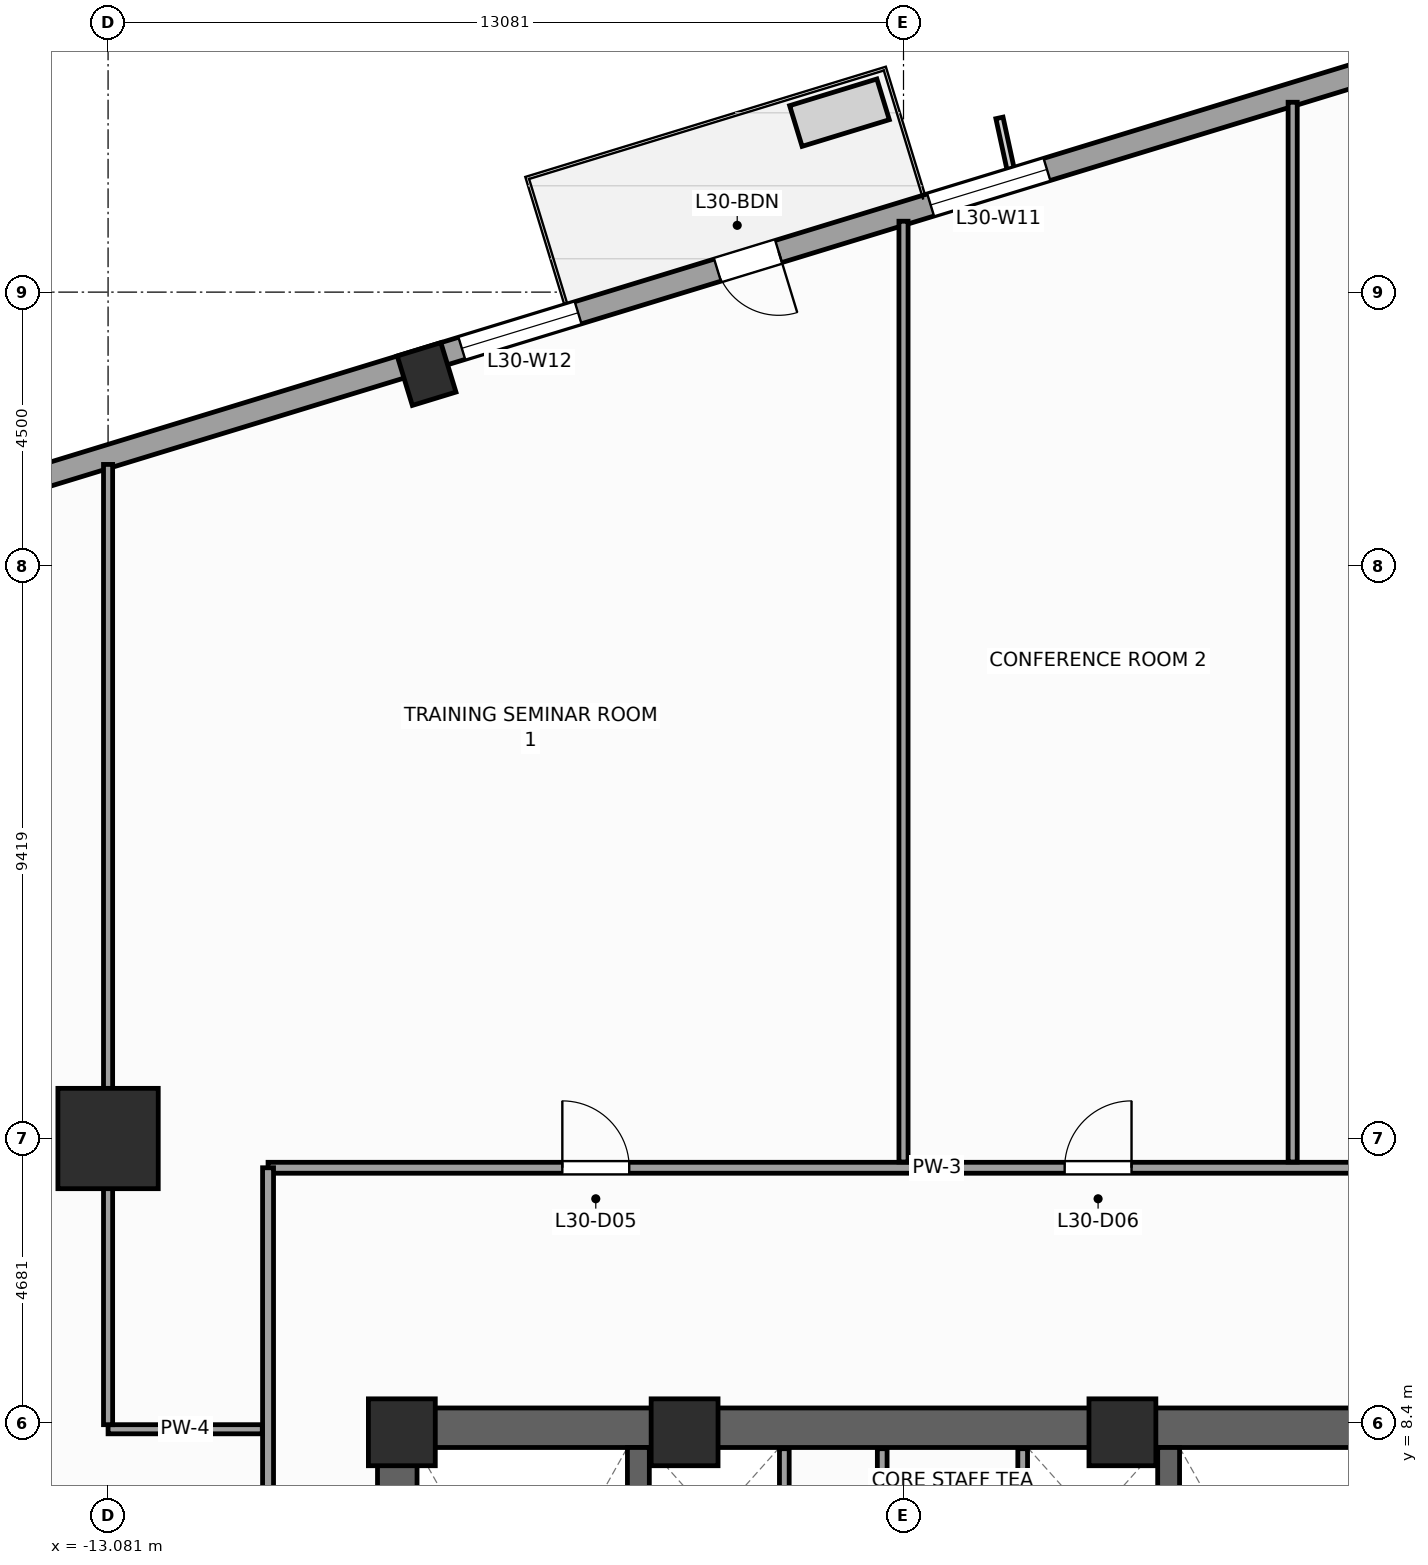
"""IFC4 building model, lengths in metres.
Left out: names, types, materials, properties, quantities, classifications, styles, units other than length and angle.
Written with IfcOpenShell. Run it as: python <this file> out.ifc"""

import sys

from ifc_helpers import new_model, si_unit, direction, frame, frame_2d, origin, origin_2d, place, context, subcontext, project, spatial, rectangle, extrude, source, transform, mapped, element, fill, save


model = new_model("IFC4")
c1 = context("Model", 3, precision=1e-05, world=origin(), true_north=direction((0.0, 1.0)))
c2 = subcontext(c1, "Body", "Model", "MODEL_VIEW")
j1 = project(units=[si_unit("LENGTHUNIT", "METRE"), si_unit("PLANEANGLEUNIT", "RADIAN")], contexts=[c1])
p1 = place(None, origin())
s1 = spatial("IfcSite", under=j1, at=p1, CompositionType="ELEMENT")
p2 = place(p1, origin())
s2 = spatial("IfcBuilding", under=s1, at=p2, CompositionType="ELEMENT")
p3 = place(p2, frame((0.0, 0.0, 127.2)))
s3 = spatial("IfcBuildingStorey", under=s2, at=p3, CompositionType="ELEMENT", Elevation=127.2)
p4 = place(p3, frame((-8.65, 8.325, 0.0), z_axis=(0.0, 0.0, 1.0), x_axis=(1.0, 0.0, 0.0)))
e1 = element("IfcWall", 1, at=p4, inside=s3, PredefinedType="SHEAR", context=c2, shape_type="SweptSolid", body=[
    extrude(rectangle(XDim=17.3, YDim=0.65, at=frame_2d((8.65, 0.0))), origin(), (0.0, 0.0, 1.0), 4.0),
])
p5 = place(p3, frame((-8.325, -8.0, 0.0), z_axis=(0.0, 0.0, 1.0), x_axis=(0.0, 1.0, 0.0)))
e2 = element("IfcWall", 2, at=p5, inside=s3, PredefinedType="SHEAR", context=c2, shape_type="SweptSolid", body=[
    extrude(rectangle(XDim=16.0, YDim=0.65, at=frame_2d((8.0, 0.0))), origin(), (0.0, 0.0, 1.0), 4.0),
])
p6 = place(p5, frame((4.69, 0.0, 0.0)))
e3 = element("IfcOpeningElement", 3, at=p6, cuts=e2, PredefinedType="OPENING", context=c2, shape_type="SweptSolid", body=[
    extrude(rectangle(XDim=1.3, YDim=2.2, at=frame_2d((0.65, 1.1))), frame((0.0, 0.335, 0.0), z_axis=(0.0, -1.0, 0.0), x_axis=(1.0, 0.0, 0.0)), (0.0, 0.0, 1.0), 0.67),
])
for number, where, z_axis, x_axis in (
    (4, (-4.36, -8.0, 0.0), (0.0, 0.0, 1.0), (0.0, 1.0, 0.0)),
    (5, (4.36, -8.0, 0.0), (0.0, 0.0, 1.0), (0.0, 1.0, 0.0)),
):
    element("IfcWall", number, at=place(p3, frame(where, z_axis=z_axis, x_axis=x_axis)), inside=s3, PredefinedType="SHEAR", context=c2, shape_type="SweptSolid", body=[
        extrude(rectangle(XDim=16.0, YDim=0.36, at=frame_2d((8.0, 0.0))), origin(), (0.0, 0.0, 1.0), 4.0),
    ])
m1 = source(origin(), c2, "Body", "SweptSolid", [
    extrude(rectangle(XDim=1.1, YDim=1.1, at=origin_2d()), origin(), (0.0, 0.0, 1.0), 4.0),
])
for number, where, z_axis, x_axis in (
    (6, (-8.25, 8.25, 0.0), (0.0, 0.0, 1.0), (1.0, 0.0, 0.0)),
    (7, (-3.6, 8.25, 0.0), (0.0, 0.0, 1.0), (1.0, 0.0, 0.0)),
    (8, (3.6, 8.25, 0.0), (0.0, 0.0, 1.0), (1.0, 0.0, 0.0)),
):
    element("IfcColumn", number, at=place(p3, frame(where, z_axis=z_axis, x_axis=x_axis)), inside=s3, PredefinedType="PILASTER", context=c2, shape_type="MappedRepresentation", body=[
        mapped(m1, transform((0.0, 0.0, 0.0), scale=1.0)),
    ])
m2 = source(origin(), c2, "Body", "SweptSolid", [
    extrude(rectangle(XDim=1.65, YDim=1.65, at=origin_2d()), origin(), (0.0, 0.0, 1.0), 4.0),
])
p7 = place(p3, frame((-13.081, 13.081, 0.0), z_axis=(0.0, 0.0, 1.0), x_axis=(1.0, 0.0, 0.0)))
e9 = element("IfcColumn", 9, at=p7, inside=s3, PredefinedType="COLUMN", context=c2, shape_type="MappedRepresentation", body=[
    mapped(m2, transform((0.0, 0.0, 0.0), scale=1.0)),
])
m3 = source(origin(), c2, "Body", "SweptSolid", [
    extrude(rectangle(XDim=0.75, YDim=0.85, at=origin_2d()), origin(), (0.0, 0.0, 1.0), 4.0),
])
p8 = place(p3, frame((-7.843, 25.653, 0.0), z_axis=(0.0, 0.0, 1.0), x_axis=(0.956304755963, 0.292371704723, 0.0)))
e10 = element("IfcColumn", 10, at=p8, inside=s3, PredefinedType="COLUMN", context=c2, shape_type="MappedRepresentation", body=[
    mapped(m3, transform((0.0, 0.0, 0.0), scale=1.0)),
])
p9 = place(p3, frame((14.265, 32.658, 0.0), z_axis=(0.0, 0.0, 1.0), x_axis=(-0.956304320851, -0.292373127906, 0.0)))
e11 = element("IfcWall", 11, at=p9, inside=s3, PredefinedType="STANDARD", context=c2, shape_type="SweptSolid", body=[
    extrude(rectangle(XDim=46.38, YDim=0.38, at=frame_2d((23.19, 0.0))), origin(), (0.0, 0.0, 1.0), 3.14),
])
p10 = place(p9, frame((17.065, 0.0, 0.0)))
e12 = element("IfcOpeningElement", 12, at=p10, cuts=e11, PredefinedType="OPENING", context=c2, shape_type="SweptSolid", body=[
    extrude(rectangle(XDim=1.05, YDim=2.25, at=frame_2d((0.525, 1.125))), frame((0.0, 0.2, 0.0), z_axis=(0.0, -1.0, 0.0), x_axis=(1.0, 0.0, 0.0)), (0.0, 0.0, 1.0), 0.4),
])
p11 = place(p9, frame((4.865, 0.0, 0.51)))
e13 = element("IfcOpeningElement", 13, at=p11, cuts=e11, PredefinedType="OPENING", context=c2, shape_type="SweptSolid", body=[
    extrude(rectangle(XDim=1.4, YDim=2.4, at=frame_2d((0.7, 1.2))), frame((0.0, 0.2, 0.0), z_axis=(0.0, -1.0, 0.0), x_axis=(1.0, 0.0, 0.0)), (0.0, 0.0, 1.0), 0.4),
])
p12 = place(p9, frame((12.45, 0.0, 0.51)))
e14 = element("IfcOpeningElement", 14, at=p12, cuts=e11, PredefinedType="OPENING", context=c2, shape_type="SweptSolid", body=[
    extrude(rectangle(XDim=2.0, YDim=2.4, at=frame_2d((1.0, 1.2))), frame((0.0, 0.2, 0.0), z_axis=(0.0, -1.0, 0.0), x_axis=(1.0, 0.0, 0.0)), (0.0, 0.0, 1.0), 0.4),
])
p13 = place(p9, frame((20.512, 0.0, 0.51)))
e15 = element("IfcOpeningElement", 15, at=p13, cuts=e11, PredefinedType="OPENING", context=c2, shape_type="SweptSolid", body=[
    extrude(rectangle(XDim=2.0, YDim=2.4, at=frame_2d((1.0, 1.2))), frame((0.0, 0.2, 0.0), z_axis=(0.0, -1.0, 0.0), x_axis=(1.0, 0.0, 0.0)), (0.0, 0.0, 1.0), 0.4),
])
p14 = place(p9, frame((30.538, 0.0, 0.51)))
e16 = element("IfcOpeningElement", 16, at=p14, cuts=e11, PredefinedType="OPENING", context=c2, shape_type="SweptSolid", body=[
    extrude(rectangle(XDim=2.0, YDim=2.4, at=frame_2d((1.0, 1.2))), frame((0.0, 0.2, 0.0), z_axis=(0.0, -1.0, 0.0), x_axis=(1.0, 0.0, 0.0)), (0.0, 0.0, 1.0), 0.4),
])
p15 = place(p9, frame((39.187, 0.0, 0.51)))
e17 = element("IfcOpeningElement", 17, at=p15, cuts=e11, PredefinedType="OPENING", context=c2, shape_type="SweptSolid", body=[
    extrude(rectangle(XDim=1.4, YDim=2.4, at=frame_2d((0.7, 1.2))), frame((0.0, 0.2, 0.0), z_axis=(0.0, -1.0, 0.0), x_axis=(1.0, 0.0, 0.0)), (0.0, 0.0, 1.0), 0.4),
])
for number, where, z_axis, x_axis in (
    (18, (-1.96, 4.58, 0.0), (0.0, 0.0, 1.0), (0.0, 1.0, 0.0)),
    (19, (1.96, 4.58, 0.0), (0.0, 0.0, 1.0), (0.0, 1.0, 0.0)),
):
    element("IfcWall", number, at=place(p3, frame(where, z_axis=z_axis, x_axis=x_axis)), inside=s3, PredefinedType="PARTITIONING", context=c2, shape_type="SweptSolid", body=[
        extrude(rectangle(XDim=3.4, YDim=0.16, at=frame_2d((1.7, 0.0))), origin(), (0.0, 0.0, 1.0), 3.74),
    ])
p16 = place(p3, frame((-0.35, 4.6, 0.0), z_axis=(0.0, 0.0, 1.0), x_axis=(0.0, 1.0, 0.0)))
e20 = element("IfcWall", 20, at=p16, inside=s3, PredefinedType="PARTITIONING", context=c2, shape_type="SweptSolid", body=[
    extrude(rectangle(XDim=3.38, YDim=0.16, at=frame_2d((1.69, 0.0))), origin(), (0.0, 0.0, 1.0), 3.74),
])
p17 = place(p3, frame((-10.45, 12.6, 0.0), z_axis=(0.0, 0.0, 1.0), x_axis=(1.0, 0.0, 0.0)))
e21 = element("IfcWall", 21, at=p17, inside=s3, PredefinedType="PARTITIONING", context=c2, shape_type="SweptSolid", body=[
    extrude(rectangle(XDim=22.0, YDim=0.18, at=frame_2d((11.0, 0.0))), origin(), (0.0, 0.0, 1.0), 3.74),
])
p18 = place(p17, frame((4.839, 0.0, 0.0)))
e22 = element("IfcOpeningElement", 22, at=p18, cuts=e21, PredefinedType="OPENING", context=c2, shape_type="SweptSolid", body=[
    extrude(rectangle(XDim=1.1, YDim=2.2, at=frame_2d((0.55, 1.1))), frame((0.0, 0.1, 0.0), z_axis=(0.0, -1.0, 0.0), x_axis=(1.0, 0.0, 0.0)), (0.0, 0.0, 1.0), 0.2),
])
p19 = place(p17, frame((13.1, 0.0, 0.0)))
e23 = element("IfcOpeningElement", 23, at=p19, cuts=e21, PredefinedType="OPENING", context=c2, shape_type="SweptSolid", body=[
    extrude(rectangle(XDim=1.1, YDim=2.2, at=frame_2d((0.55, 1.1))), frame((0.0, 0.1, 0.0), z_axis=(0.0, -1.0, 0.0), x_axis=(1.0, 0.0, 0.0)), (0.0, 0.0, 1.0), 0.2),
])
p20 = place(p17, frame((18.71, 0.0, 0.0)))
e24 = element("IfcOpeningElement", 24, at=p20, cuts=e21, PredefinedType="OPENING", context=c2, shape_type="SweptSolid", body=[
    extrude(rectangle(XDim=1.1, YDim=2.2, at=frame_2d((0.55, 1.1))), frame((0.0, 0.1, 0.0), z_axis=(0.0, -1.0, 0.0), x_axis=(1.0, 0.0, 0.0)), (0.0, 0.0, 1.0), 0.2),
])
p21 = place(p3, frame((-10.45, -1.05, 0.0), z_axis=(0.0, 0.0, 1.0), x_axis=(0.0, 1.0, 0.0)))
e25 = element("IfcWall", 25, at=p21, inside=s3, PredefinedType="PARTITIONING", context=c2, shape_type="SweptSolid", body=[
    extrude(rectangle(XDim=13.65, YDim=0.18, at=frame_2d((6.825, 0.0))), origin(), (0.0, 0.0, 1.0), 3.74),
])
p22 = place(p21, frame((1.455, 0.0, 0.0)))
e26 = element("IfcOpeningElement", 26, at=p22, cuts=e25, PredefinedType="OPENING", context=c2, shape_type="SweptSolid", body=[
    extrude(rectangle(XDim=0.95, YDim=2.1, at=frame_2d((0.475, 1.05))), frame((0.0, 0.1, 0.0), z_axis=(0.0, -1.0, 0.0), x_axis=(1.0, 0.0, 0.0)), (0.0, 0.0, 1.0), 0.2),
])
p23 = place(p21, frame((6.462, 0.0, 0.0)))
e27 = element("IfcOpeningElement", 27, at=p23, cuts=e25, PredefinedType="OPENING", context=c2, shape_type="SweptSolid", body=[
    extrude(rectangle(XDim=1.1, YDim=2.2, at=frame_2d((0.55, 1.1))), frame((0.0, 0.1, 0.0), z_axis=(0.0, -1.0, 0.0), x_axis=(1.0, 0.0, 0.0)), (0.0, 0.0, 1.0), 0.2),
])
p24 = place(p3, frame((-10.545, 8.3, 0.0), z_axis=(0.0, 0.0, 1.0), x_axis=(-1.0, 0.0, 0.0)))
e28 = element("IfcWall", 28, at=p24, inside=s3, PredefinedType="PARTITIONING", context=c2, shape_type="SweptSolid", body=[
    extrude(rectangle(XDim=2.536, YDim=0.15, at=frame_2d((1.268, 0.0))), origin(), (0.0, 0.0, 1.0), 3.74),
])
p25 = place(p3, frame((-13.081, 8.375, 0.0), z_axis=(0.0, 0.0, 1.0), x_axis=(0.0, 1.0, 0.0)))
e29 = element("IfcWall", 29, at=p25, inside=s3, PredefinedType="PARTITIONING", context=c2, shape_type="SweptSolid", body=[
    extrude(rectangle(XDim=15.792, YDim=0.15, at=frame_2d((7.896, 0.0))), origin(), (0.0, 0.0, 1.0), 2.732),
])
p26 = place(p3, frame((0.0, 12.695, 0.0), z_axis=(0.0, 0.0, 1.0), x_axis=(0.0, 1.0, 0.0)))
e30 = element("IfcWall", 30, at=p26, inside=s3, PredefinedType="PARTITIONING", context=c2, shape_type="SweptSolid", body=[
    extrude(rectangle(XDim=15.471, YDim=0.15, at=frame_2d((7.735, 0.0))), origin(), (0.0, 0.0, 1.0), 3.74),
])
p27 = place(p3, frame((6.4, 12.695, 0.0), z_axis=(0.0, 0.0, 1.0), x_axis=(0.0, 1.0, 0.0)))
e31 = element("IfcWall", 31, at=p27, inside=s3, PredefinedType="PARTITIONING", context=c2, shape_type="SweptSolid", body=[
    extrude(rectangle(XDim=17.427, YDim=0.15, at=frame_2d((8.714, 0.0))), origin(), (0.0, 0.0, 1.0), 3.74),
])
m4 = source(origin(), c2, "Body", "SweptSolid", [
    extrude(rectangle(XDim=1.05, YDim=2.25, at=frame_2d((0.525, 1.125))), frame((0.0, 0.025, 0.0), z_axis=(0.0, -1.0, 0.0), x_axis=(1.0, 0.0, 0.0)), (0.0, 0.0, 1.0), 0.05),
])
p28 = place(p10, origin())
e32 = element("IfcDoor", 32, at=p28, inside=s3, OperationType="SINGLE_SWING_LEFT", PredefinedType="DOOR", context=c2, shape_type="MappedRepresentation", body=[
    mapped(m4, transform((0.0, 0.0, 0.0), scale=1.0)),
])
fill(e12, e32)
m5 = source(origin(), c2, "Body", "SweptSolid", [
    extrude(rectangle(XDim=2.0, YDim=2.4, at=frame_2d((1.0, 1.2))), frame((0.0, 0.03, 0.0), z_axis=(0.0, -1.0, 0.0), x_axis=(1.0, 0.0, 0.0)), (0.0, 0.0, 1.0), 0.06),
])
p29 = place(p12, origin())
e33 = element("IfcWindow", 33, at=p29, inside=s3, PartitioningType="SINGLE_PANEL", PredefinedType="WINDOW", context=c2, shape_type="MappedRepresentation", body=[
    mapped(m5, transform((0.0, 0.0, 0.0), scale=1.0)),
])
fill(e14, e33)
p30 = place(p13, origin())
e34 = element("IfcWindow", 34, at=p30, inside=s3, PartitioningType="SINGLE_PANEL", PredefinedType="WINDOW", context=c2, shape_type="MappedRepresentation", body=[
    mapped(m5, transform((0.0, 0.0, 0.0), scale=1.0)),
])
fill(e15, e34)
m6 = source(origin(), c2, "Body", "SweptSolid", [
    extrude(rectangle(XDim=1.1, YDim=2.2, at=frame_2d((0.55, 1.1))), frame((0.0, 0.025, 0.0), z_axis=(0.0, -1.0, 0.0), x_axis=(1.0, 0.0, 0.0)), (0.0, 0.0, 1.0), 0.05),
])
p31 = place(p18, origin())
e35 = element("IfcDoor", 35, at=p31, inside=s3, OperationType="SINGLE_SWING_LEFT", PredefinedType="DOOR", context=c2, shape_type="MappedRepresentation", body=[
    mapped(m6, transform((0.0, 0.0, 0.0), scale=1.0)),
])
fill(e22, e35)
p32 = place(p19, origin())
e36 = element("IfcDoor", 36, at=p32, inside=s3, OperationType="SINGLE_SWING_RIGHT", PredefinedType="DOOR", context=c2, shape_type="MappedRepresentation", body=[
    mapped(m6, transform((0.0, 0.0, 0.0), scale=1.0)),
])
fill(e23, e36)
save(model, sys.argv[1])
